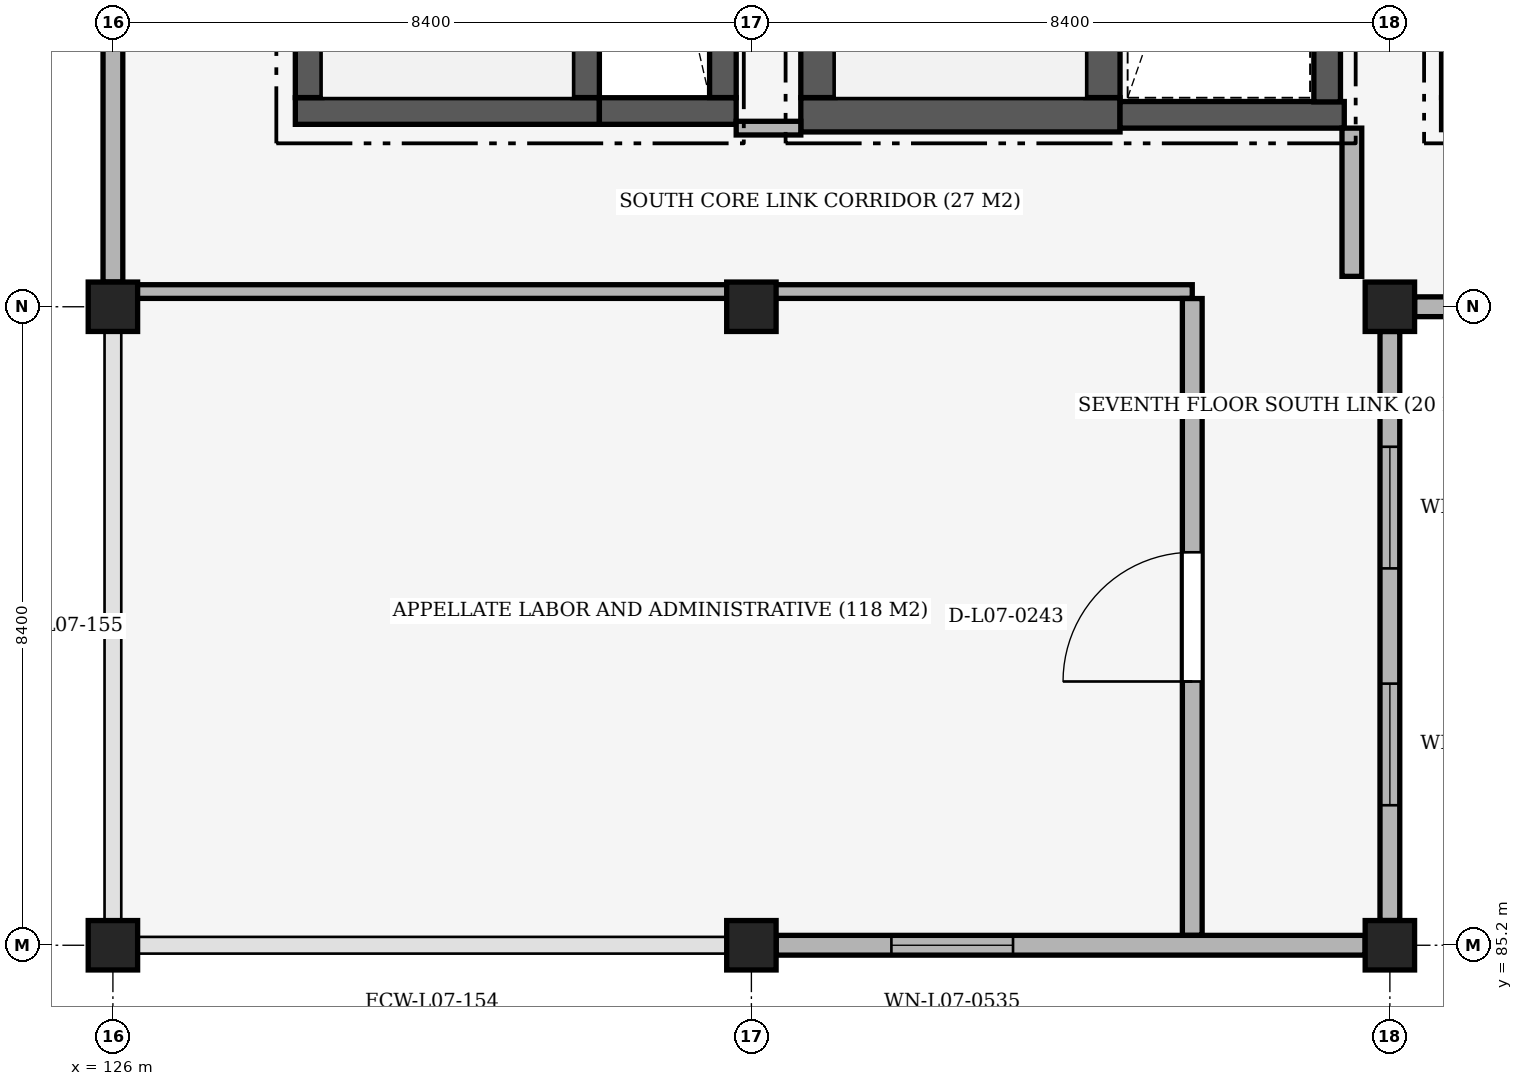
"""IFC4 building model, lengths in metres.
Left out: names, types, materials, properties, quantities, classifications, styles, units other than length and angle.
Written with IfcOpenShell. Run it as: python <this file> out.ifc"""

import sys

from ifc_helpers import new_model, si_unit, direction, frame, frame_2d, origin, origin_2d, place, context, subcontext, project, spatial, rectangle, extrude, element, fill, save


model = new_model("IFC4")
c1 = context("Model", 3, precision=1e-05, world=origin(), true_north=direction((0.0, 1.0)))
c2 = subcontext(c1, "Body", "Model", "MODEL_VIEW")
j1 = project(units=[si_unit("LENGTHUNIT", "METRE"), si_unit("PLANEANGLEUNIT", "RADIAN")], contexts=[c1])
p1 = place(None, origin())
s1 = spatial("IfcSite", under=j1, at=p1, CompositionType="ELEMENT")
p2 = place(p1, origin())
s2 = spatial("IfcBuilding", under=s1, at=p2, CompositionType="ELEMENT")
p3 = place(p2, frame((0.0, 0.0, 33.6)))
s3 = spatial("IfcBuildingStorey", under=s2, at=p3, CompositionType="ELEMENT", Elevation=33.6)
for number, where, z_axis, x_axis in (
    (1, (126.0, 85.2, 0.0), (0.0, 0.0, 1.0), (1.0, 0.0, 0.0)),
    (2, (126.0, 93.6, 0.0), (0.0, 0.0, 1.0), (1.0, 0.0, 0.0)),
    (3, (134.4, 85.2, 0.0), (0.0, 0.0, 1.0), (1.0, 0.0, 0.0)),
    (4, (134.4, 93.6, 0.0), (0.0, 0.0, 1.0), (1.0, 0.0, 0.0)),
    (5, (142.8, 85.2, 0.0), (0.0, 0.0, 1.0), (1.0, 0.0, 0.0)),
    (6, (142.8, 93.6, 0.0), (0.0, 0.0, 1.0), (1.0, 0.0, 0.0)),
):
    element("IfcColumn", number, at=place(p3, frame(where, z_axis=z_axis, x_axis=x_axis)), inside=s3, PredefinedType="COLUMN", context=c2, shape_type="SweptSolid", body=[
        extrude(rectangle(XDim=0.65, YDim=0.65, at=origin_2d()), origin(), (0.0, 0.0, 1.0), 4.2),
    ])
p4 = place(p3, frame((142.475, 85.2, 0.0), z_axis=(0.0, 0.0, 1.0), x_axis=(-1.0, 0.0, 0.0)))
e7 = element("IfcWall", 7, at=p4, inside=s3, PredefinedType="SOLIDWALL", context=c2, shape_type="SweptSolid", body=[
    extrude(rectangle(XDim=7.75, YDim=0.26, at=frame_2d((3.875, 0.0))), origin(), (0.0, 0.0, 1.0), 3.25),
])
p5 = place(p4, frame((4.633, 0.0, 1.05)))
e8 = element("IfcOpeningElement", 8, at=p5, cuts=e7, PredefinedType="OPENING", context=c2, shape_type="SweptSolid", body=[
    extrude(rectangle(XDim=1.6, YDim=1.8, at=frame_2d((0.8, 0.9))), frame((0.0, 0.145, 0.0), z_axis=(0.0, -1.0, 0.0), x_axis=(1.0, 0.0, 0.0)), (0.0, 0.0, 1.0), 0.29),
])
p6 = place(p3, frame((126.0, 93.925, 0.0), z_axis=(0.0, 0.0, 1.0), x_axis=(0.0, 1.0, 0.0)))
e9 = element("IfcWall", 9, at=p6, inside=s3, PredefinedType="SOLIDWALL", context=c2, shape_type="SweptSolid", body=[
    extrude(rectangle(XDim=5.325, YDim=0.26, at=frame_2d((2.663, 0.0))), origin(), (0.0, 0.0, 1.0), 3.4),
])
p7 = place(p3, frame((150.875, 93.6, 0.0), z_axis=(0.0, 0.0, 1.0), x_axis=(-1.0, 0.0, 0.0)))
e10 = element("IfcWall", 10, at=p7, inside=s3, PredefinedType="SOLIDWALL", context=c2, shape_type="SweptSolid", body=[
    extrude(rectangle(XDim=7.75, YDim=0.26, at=frame_2d((3.875, 0.0))), origin(), (0.0, 0.0, 1.0), 3.25),
])
p8 = place(p7, frame((1.517, 0.0, 1.05)))
e11 = element("IfcOpeningElement", 11, at=p8, cuts=e10, PredefinedType="OPENING", context=c2, shape_type="SweptSolid", body=[
    extrude(rectangle(XDim=1.6, YDim=1.8, at=frame_2d((0.8, 0.9))), frame((0.0, 0.145, 0.0), z_axis=(0.0, -1.0, 0.0), x_axis=(1.0, 0.0, 0.0)), (0.0, 0.0, 1.0), 0.29),
])
p9 = place(p7, frame((4.633, 0.0, 1.05)))
e12 = element("IfcOpeningElement", 12, at=p9, cuts=e10, PredefinedType="OPENING", context=c2, shape_type="SweptSolid", body=[
    extrude(rectangle(XDim=1.6, YDim=1.8, at=frame_2d((0.8, 0.9))), frame((0.0, 0.145, 0.0), z_axis=(0.0, -1.0, 0.0), x_axis=(1.0, 0.0, 0.0)), (0.0, 0.0, 1.0), 0.29),
])
p10 = place(p3, frame((142.8, 93.275, 0.0), z_axis=(0.0, 0.0, 1.0), x_axis=(0.0, -1.0, 0.0)))
e13 = element("IfcWall", 13, at=p10, inside=s3, PredefinedType="SOLIDWALL", context=c2, shape_type="SweptSolid", body=[
    extrude(rectangle(XDim=7.75, YDim=0.26, at=frame_2d((3.875, 0.0))), origin(), (0.0, 0.0, 1.0), 3.25),
])
p11 = place(p10, frame((1.517, 0.0, 1.05)))
e14 = element("IfcOpeningElement", 14, at=p11, cuts=e13, PredefinedType="OPENING", context=c2, shape_type="SweptSolid", body=[
    extrude(rectangle(XDim=1.6, YDim=1.8, at=frame_2d((0.8, 0.9))), frame((0.0, 0.145, 0.0), z_axis=(0.0, -1.0, 0.0), x_axis=(1.0, 0.0, 0.0)), (0.0, 0.0, 1.0), 0.29),
])
p12 = place(p10, frame((4.633, 0.0, 1.05)))
e15 = element("IfcOpeningElement", 15, at=p12, cuts=e13, PredefinedType="OPENING", context=c2, shape_type="SweptSolid", body=[
    extrude(rectangle(XDim=1.6, YDim=1.8, at=frame_2d((0.8, 0.9))), frame((0.0, 0.145, 0.0), z_axis=(0.0, -1.0, 0.0), x_axis=(1.0, 0.0, 0.0)), (0.0, 0.0, 1.0), 0.29),
])
p13 = place(p3, frame((128.4, 96.175, 0.0), z_axis=(0.0, 0.0, 1.0), x_axis=(1.0, 0.0, 0.0)))
e16 = element("IfcWall", 16, at=p13, inside=s3, PredefinedType="SHEAR", context=c2, shape_type="SweptSolid", body=[
    extrude(rectangle(XDim=4.0, YDim=0.35, at=frame_2d((2.0, 0.0))), origin(), (0.0, 0.0, 1.0), 3.95),
])
for number, where, z_axis, x_axis in (
    (17, (128.575, 96.352, 0.0), (0.0, 0.0, 1.0), (0.0, 1.0, 0.0)),
    (18, (132.225, 96.352, 0.0), (0.0, 0.0, 1.0), (0.0, 1.0, 0.0)),
):
    element("IfcWall", number, at=place(p3, frame(where, z_axis=z_axis, x_axis=x_axis)), inside=s3, PredefinedType="SHEAR", context=c2, shape_type="SweptSolid", body=[
        extrude(rectangle(XDim=6.896, YDim=0.35, at=frame_2d((3.448, 0.0))), origin(), (0.0, 0.0, 1.0), 3.95),
    ])
p14 = place(p3, frame((132.4, 96.175, 0.0), z_axis=(0.0, 0.0, 1.0), x_axis=(1.0, 0.0, 0.0)))
e19 = element("IfcWall", 19, at=p14, inside=s3, PredefinedType="SHEAR", context=c2, shape_type="SweptSolid", body=[
    extrude(rectangle(XDim=1.8, YDim=0.35, at=frame_2d((0.9, 0.0))), origin(), (0.0, 0.0, 1.0), 3.95),
])
p15 = place(p3, frame((134.025, 96.352, 0.0), z_axis=(0.0, 0.0, 1.0), x_axis=(0.0, 1.0, 0.0)))
e20 = element("IfcWall", 20, at=p15, inside=s3, PredefinedType="SHEAR", context=c2, shape_type="SweptSolid", body=[
    extrude(rectangle(XDim=7.155, YDim=0.35, at=frame_2d((3.578, 0.0))), origin(), (0.0, 0.0, 1.0), 3.95),
])
p16 = place(p3, frame((135.05, 96.125, 0.0), z_axis=(0.0, 0.0, 1.0), x_axis=(1.0, 0.0, 0.0)))
e21 = element("IfcWall", 21, at=p16, inside=s3, PredefinedType="SHEAR", context=c2, shape_type="SweptSolid", body=[
    extrude(rectangle(XDim=4.2, YDim=0.45, at=frame_2d((2.1, 0.0))), origin(), (0.0, 0.0, 1.0), 3.95),
])
for number, where, z_axis, x_axis in (
    (22, (135.275, 96.352, 0.0), (0.0, 0.0, 1.0), (0.0, 1.0, 0.0)),
    (23, (139.025, 96.352, 0.0), (0.0, 0.0, 1.0), (0.0, 1.0, 0.0)),
):
    element("IfcWall", number, at=place(p3, frame(where, z_axis=z_axis, x_axis=x_axis)), inside=s3, PredefinedType="SHEAR", context=c2, shape_type="SweptSolid", body=[
        extrude(rectangle(XDim=6.896, YDim=0.45, at=frame_2d((3.448, 0.0))), origin(), (0.0, 0.0, 1.0), 3.95),
    ])
p17 = place(p3, frame((139.25, 96.125, 0.0), z_axis=(0.0, 0.0, 1.0), x_axis=(1.0, 0.0, 0.0)))
e24 = element("IfcWall", 24, at=p17, inside=s3, PredefinedType="SHEAR", context=c2, shape_type="SweptSolid", body=[
    extrude(rectangle(XDim=2.95, YDim=0.35, at=frame_2d((1.475, 0.0))), origin(), (0.0, 0.0, 1.0), 3.95),
])
p18 = place(p3, frame((141.975, 96.295, 0.0), z_axis=(0.0, 0.0, 1.0), x_axis=(0.0, 1.0, 0.0)))
e25 = element("IfcWall", 25, at=p18, inside=s3, PredefinedType="SHEAR", context=c2, shape_type="SweptSolid", body=[
    extrude(rectangle(XDim=7.212, YDim=0.35, at=frame_2d((3.606, 0.0))), origin(), (0.0, 0.0, 1.0), 3.95),
])
p19 = place(p3, frame((143.48, 96.14, 0.0), z_axis=(0.0, 0.0, 1.0), x_axis=(1.0, 0.0, 0.0)))
e26 = element("IfcWall", 26, at=p19, inside=s3, PredefinedType="SHEAR", context=c2, shape_type="SweptSolid", body=[
    extrude(rectangle(XDim=4.14, YDim=0.42, at=frame_2d((2.07, 0.0))), origin(), (0.0, 0.0, 1.0), 3.95),
])
p20 = place(p3, frame((143.69, 96.352, 0.0), z_axis=(0.0, 0.0, 1.0), x_axis=(0.0, 1.0, 0.0)))
e27 = element("IfcWall", 27, at=p20, inside=s3, PredefinedType="SHEAR", context=c2, shape_type="SweptSolid", body=[
    extrude(rectangle(XDim=6.896, YDim=0.42, at=frame_2d((3.448, 0.0))), origin(), (0.0, 0.0, 1.0), 3.95),
])
p21 = place(p3, frame((126.089, 93.8, 0.0), z_axis=(0.0, 0.0, 1.0), x_axis=(1.0, 0.0, 0.0)))
e28 = element("IfcWall", 28, at=p21, inside=s3, PredefinedType="PARTITIONING", context=c2, shape_type="SweptSolid", body=[
    extrude(rectangle(XDim=14.111, YDim=0.18, at=frame_2d((7.055, 0.0))), origin(), (0.0, 0.0, 1.0), 3.25),
])
p22 = place(p3, frame((134.2, 95.95, 0.0), z_axis=(0.0, 0.0, 1.0), x_axis=(1.0, 0.0, 0.0)))
e29 = element("IfcWall", 29, at=p22, inside=s3, PredefinedType="PARTITIONING", context=c2, shape_type="SweptSolid", body=[
    extrude(rectangle(XDim=0.85, YDim=0.18, at=frame_2d((0.425, 0.0))), origin(), (0.0, 0.0, 1.0), 3.4),
])
p23 = place(p3, frame((140.2, 85.332, 0.0), z_axis=(0.0, 0.0, 1.0), x_axis=(0.0, 1.0, 0.0)))
e30 = element("IfcWall", 30, at=p23, inside=s3, PredefinedType="PARTITIONING", context=c2, shape_type="SweptSolid", body=[
    extrude(rectangle(XDim=8.376, YDim=0.26, at=frame_2d((4.188, 0.0))), origin(), (0.0, 0.0, 1.0), 3.25),
])
p24 = place(p23, frame((3.338, 0.0, 0.0)))
e31 = element("IfcOpeningElement", 31, at=p24, cuts=e30, PredefinedType="OPENING", context=c2, shape_type="SweptSolid", body=[
    extrude(rectangle(XDim=1.7, YDim=2.35, at=frame_2d((0.85, 1.175))), frame((0.0, 0.145, 0.0), z_axis=(0.0, -1.0, 0.0), x_axis=(1.0, 0.0, 0.0)), (0.0, 0.0, 1.0), 0.29),
])
p25 = place(p3, frame((142.3, 94.0, 0.0), z_axis=(0.0, 0.0, 1.0), x_axis=(0.0, 1.0, 0.0)))
e32 = element("IfcWall", 32, at=p25, inside=s3, PredefinedType="PARTITIONING", context=c2, shape_type="SweptSolid", body=[
    extrude(rectangle(XDim=1.95, YDim=0.26, at=frame_2d((0.975, 0.0))), origin(), (0.0, 0.0, 1.0), 3.95),
])
p26 = place(p5, origin())
e33 = element("IfcWindow", 33, at=p26, inside=s3, PartitioningType="SINGLE_PANEL", PredefinedType="WINDOW", context=c2, shape_type="SweptSolid", body=[
    extrude(rectangle(XDim=1.6, YDim=1.8, at=frame_2d((0.8, 0.9))), frame((0.0, 0.03, 0.0), z_axis=(0.0, -1.0, 0.0), x_axis=(1.0, 0.0, 0.0)), (0.0, 0.0, 1.0), 0.06),
])
fill(e8, e33)
p27 = place(p11, origin())
e34 = element("IfcWindow", 34, at=p27, inside=s3, PartitioningType="SINGLE_PANEL", PredefinedType="WINDOW", context=c2, shape_type="SweptSolid", body=[
    extrude(rectangle(XDim=1.6, YDim=1.8, at=frame_2d((0.8, 0.9))), frame((0.0, 0.03, 0.0), z_axis=(0.0, -1.0, 0.0), x_axis=(1.0, 0.0, 0.0)), (0.0, 0.0, 1.0), 0.06),
])
fill(e14, e34)
p28 = place(p12, origin())
e35 = element("IfcWindow", 35, at=p28, inside=s3, PartitioningType="SINGLE_PANEL", PredefinedType="WINDOW", context=c2, shape_type="SweptSolid", body=[
    extrude(rectangle(XDim=1.6, YDim=1.8, at=frame_2d((0.8, 0.9))), frame((0.0, 0.03, 0.0), z_axis=(0.0, -1.0, 0.0), x_axis=(1.0, 0.0, 0.0)), (0.0, 0.0, 1.0), 0.06),
])
fill(e15, e35)
p29 = place(p24, origin())
e36 = element("IfcDoor", 36, at=p29, inside=s3, OperationType="SINGLE_SWING_LEFT", PredefinedType="DOOR", context=c2, shape_type="SweptSolid", body=[
    extrude(rectangle(XDim=1.7, YDim=2.35, at=frame_2d((0.85, 1.175))), frame((0.0, 0.025, 0.0), z_axis=(0.0, -1.0, 0.0), x_axis=(1.0, 0.0, 0.0)), (0.0, 0.0, 1.0), 0.05),
])
fill(e31, e36)
save(model, sys.argv[1])
